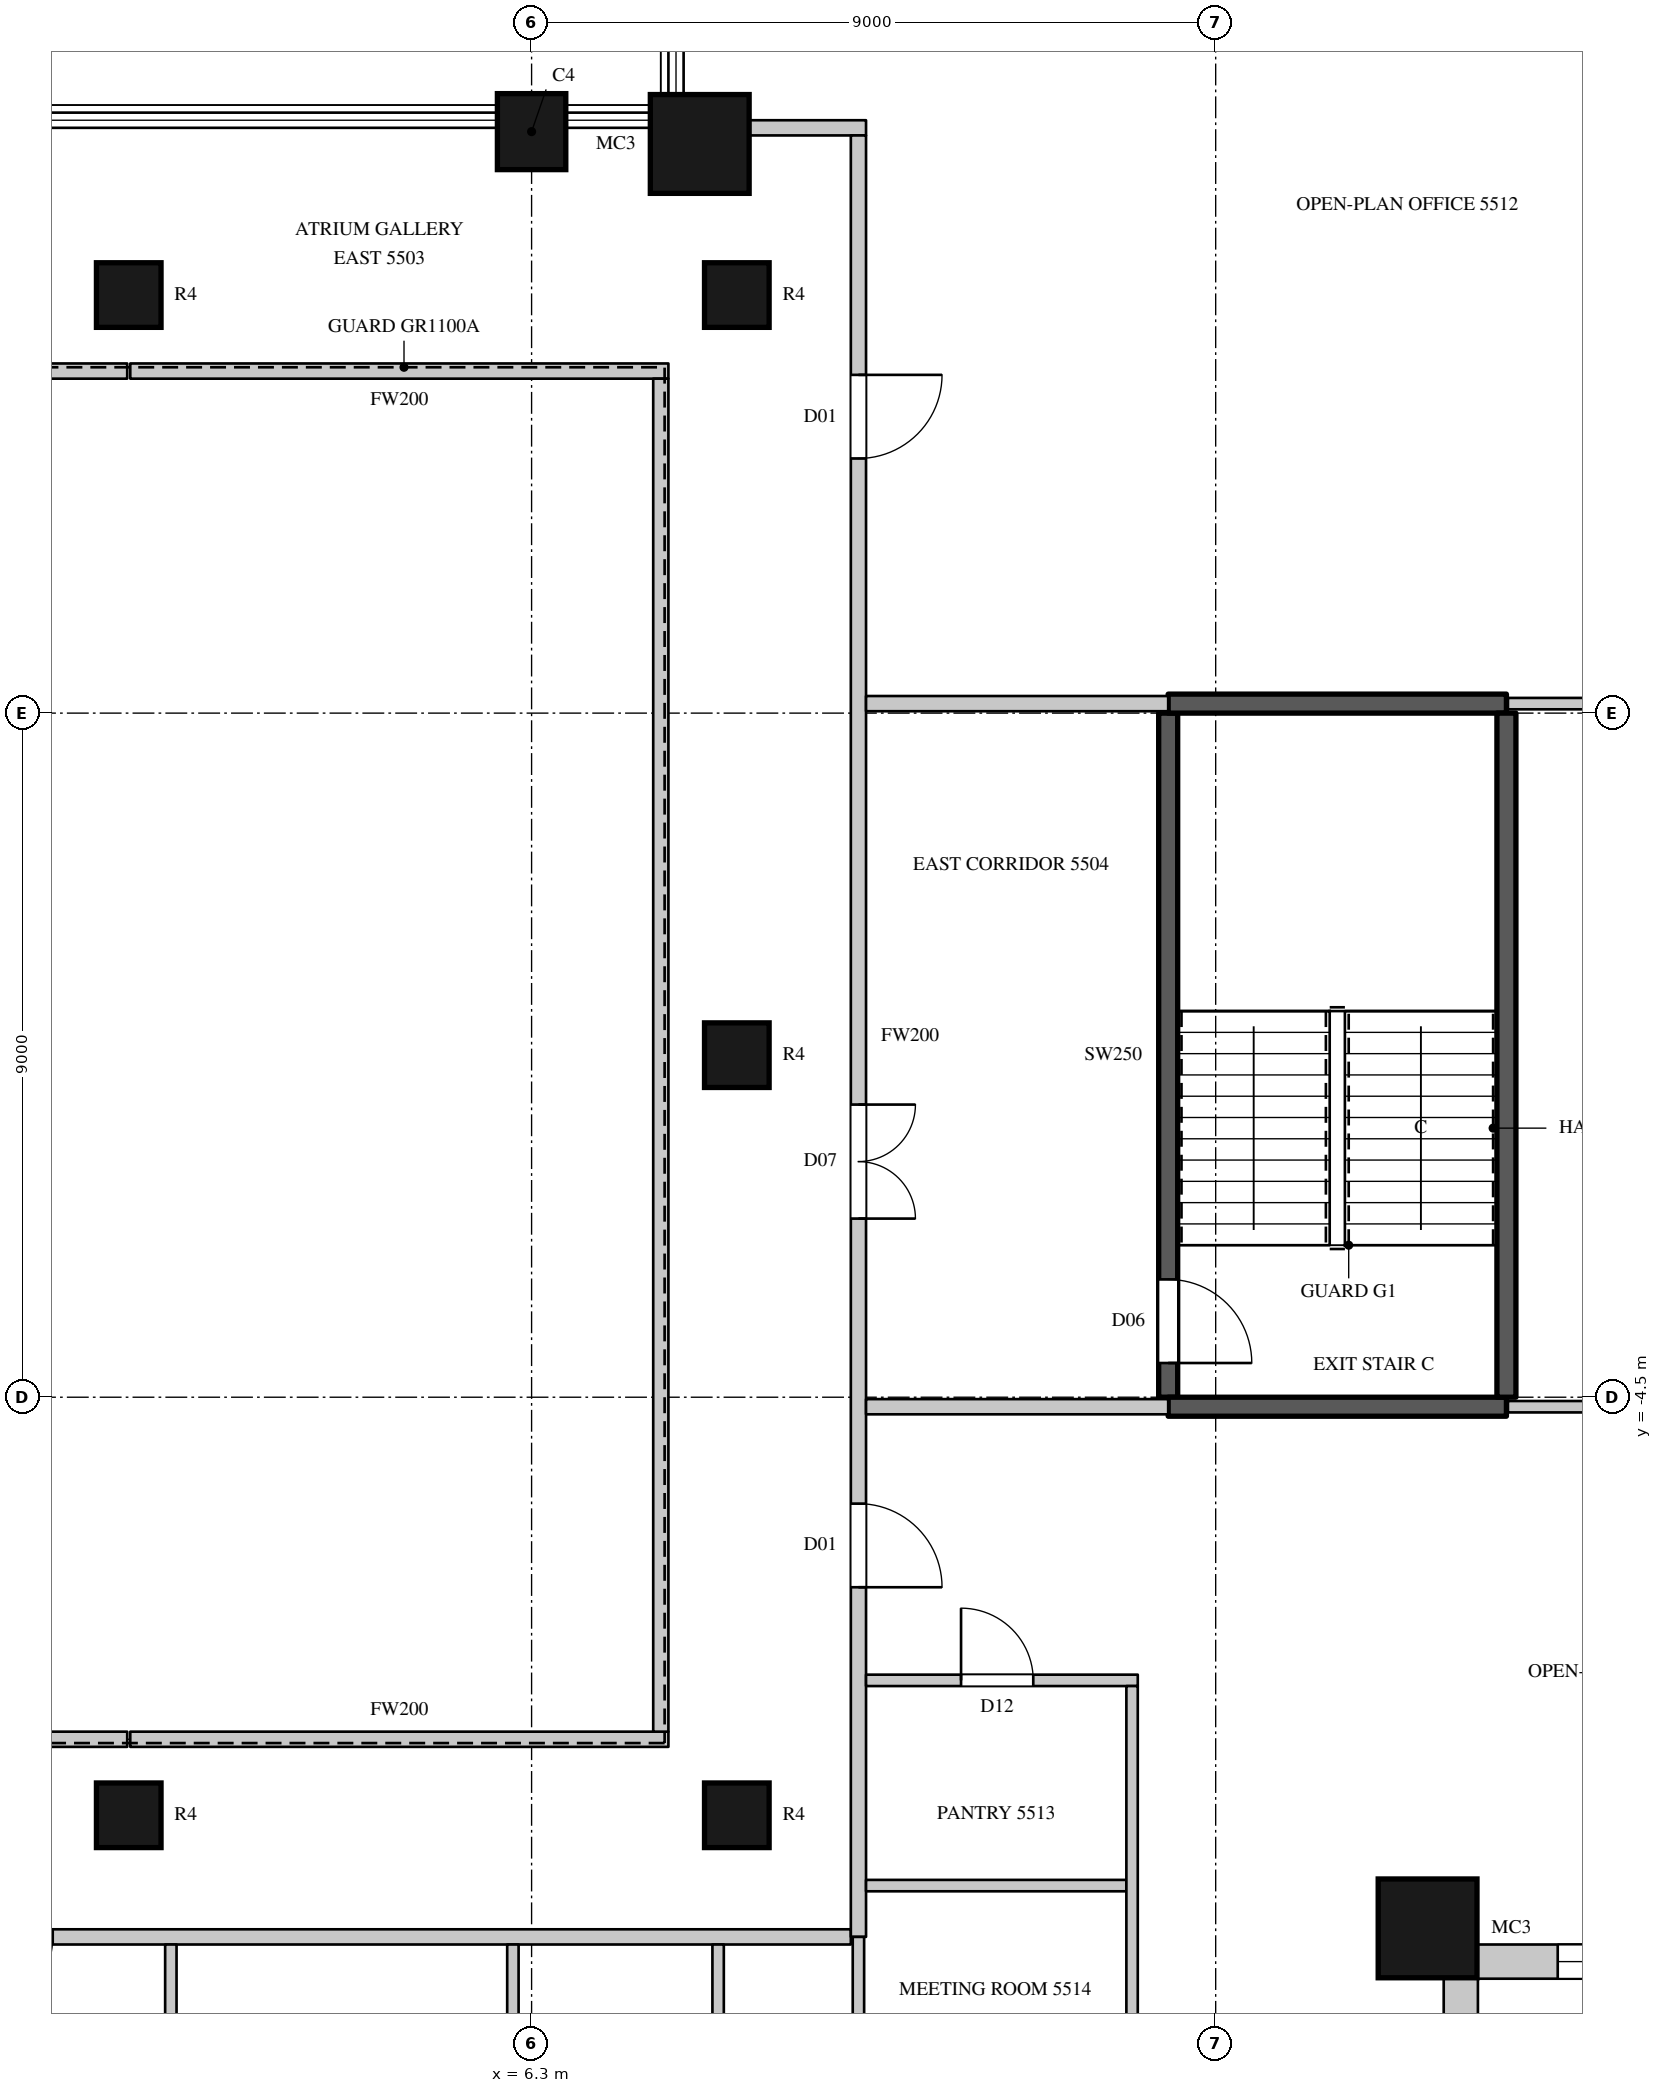
"""IFC4 building model, lengths in metres.
Left out: names, types, materials, properties, quantities, classifications, styles, units other than length and angle.
Written with IfcOpenShell. Run it as: python <this file> out.ifc"""

import sys

from ifc_helpers import new_model, si_unit, direction, frame, frame_2d, origin, origin_2d, place, context, subcontext, project, spatial, rectangle, circle, extrude, element, fill, save


model = new_model("IFC4")
c1 = context("Model", 3, precision=1e-05, world=origin(), true_north=direction((0.0, 1.0)))
c2 = subcontext(c1, "Body", "Model", "MODEL_VIEW")
j1 = project(units=[si_unit("LENGTHUNIT", "METRE"), si_unit("PLANEANGLEUNIT", "RADIAN")], contexts=[c1])
p1 = place(None, origin())
s1 = spatial("IfcSite", under=j1, at=p1, CompositionType="ELEMENT")
p2 = place(p1, origin())
s2 = spatial("IfcBuilding", under=s1, at=p2, CompositionType="ELEMENT")
p3 = place(p2, frame((0.0, 0.0, 247.5)))
s3 = spatial("IfcBuildingStorey", under=s2, at=p3, CompositionType="ELEMENT", Elevation=247.5)
p4 = place(p3, frame((8.512, 11.988, 0.0), z_axis=(0.0, 0.0, 1.0), x_axis=(1.0, 0.0, 0.0)))
e1 = element("IfcColumn", 1, at=p4, inside=s3, PredefinedType="COLUMN", context=c2, shape_type="SweptSolid", body=[
    extrude(circle(Radius=0.65, at=origin_2d()), origin(), (0.0, 0.0, 1.0), 4.1),
])
p5 = place(p3, frame((6.3, 12.15, 0.0), z_axis=(0.0, 0.0, 1.0), x_axis=(-1.0, 0.0, 0.0)))
e2 = element("IfcColumn", 2, at=p5, inside=s3, PredefinedType="COLUMN", context=c2, shape_type="SweptSolid", body=[
    extrude(rectangle(XDim=0.9, YDim=1.0, at=origin_2d()), origin(), (0.0, 0.0, 1.0), 4.1),
])
p6 = place(p3, frame((18.088, -11.488, 0.0), z_axis=(0.0, 0.0, 1.0), x_axis=(1.0, 0.0, 0.0)))
e3 = element("IfcColumn", 3, at=p6, inside=s3, PredefinedType="COLUMN", context=c2, shape_type="SweptSolid", body=[
    extrude(circle(Radius=0.65, at=origin_2d()), origin(), (0.0, 0.0, 1.0), 4.1),
])
for number, where, z_axis, x_axis in (
    (4, (1.0, -10.0, 0.0), (0.0, 0.0, 1.0), (1.0, 0.0, 0.0)),
    (5, (1.0, 10.0, 0.0), (0.0, 0.0, 1.0), (1.0, 0.0, 0.0)),
    (6, (9.0, -10.0, 0.0), (0.0, 0.0, 1.0), (1.0, 0.0, 0.0)),
    (7, (9.0, 0.0, 0.0), (0.0, 0.0, 1.0), (1.0, 0.0, 0.0)),
    (8, (9.0, 10.0, 0.0), (0.0, 0.0, 1.0), (1.0, 0.0, 0.0)),
):
    element("IfcColumn", number, at=place(p3, frame(where, z_axis=z_axis, x_axis=x_axis)), inside=s3, PredefinedType="COLUMN", context=c2, shape_type="SweptSolid", body=[
        extrude(circle(Radius=0.425, at=origin_2d()), origin(), (0.0, 0.0, 1.0), 4.1),
    ])
p7 = place(p3, frame((18.525, -16.304, 0.0), z_axis=(0.0, 0.0, 1.0), x_axis=(0.0, 1.0, 0.0)))
e9 = element("IfcWall", 9, at=p7, inside=s3, PredefinedType="SOLIDWALL", context=c2, shape_type="SweptSolid", body=[
    extrude(rectangle(XDim=4.202, YDim=0.45, at=frame_2d((2.101, 0.0))), origin(), (0.0, 0.0, 1.0), 3.8),
])
p8 = place(p7, frame((0.541, 0.0, 1.05)))
e10 = element("IfcOpeningElement", 10, at=p8, cuts=e9, PredefinedType="OPENING", context=c2, shape_type="SweptSolid", body=[
    extrude(rectangle(XDim=3.0, YDim=2.4, at=frame_2d((1.5, 1.2))), frame((0.0, 0.235, 0.0), z_axis=(0.0, -1.0, 0.0), x_axis=(1.0, 0.0, 0.0)), (0.0, 0.0, 1.0), 0.47),
])
p9 = place(p3, frame((18.701, -11.925, 0.0), z_axis=(0.0, 0.0, 1.0), x_axis=(1.0, 0.0, 0.0)))
e11 = element("IfcWall", 11, at=p9, inside=s3, PredefinedType="SOLIDWALL", context=c2, shape_type="SweptSolid", body=[
    extrude(rectangle(XDim=4.962, YDim=0.45, at=frame_2d((2.481, 0.0))), origin(), (0.0, 0.0, 1.0), 3.8),
])
p10 = place(p9, frame((1.098, 0.0, 1.05)))
e12 = element("IfcOpeningElement", 12, at=p10, cuts=e11, PredefinedType="OPENING", context=c2, shape_type="SweptSolid", body=[
    extrude(rectangle(XDim=3.0, YDim=2.4, at=frame_2d((1.5, 1.2))), frame((0.0, 0.235, 0.0), z_axis=(0.0, -1.0, 0.0), x_axis=(1.0, 0.0, 0.0)), (0.0, 0.0, 1.0), 0.47),
])
p11 = place(p3, frame((-10.9, -11.6, 0.0), z_axis=(0.0, 0.0, 1.0), x_axis=(1.0, 0.0, 0.0)))
e13 = element("IfcWall", 13, at=p11, inside=s3, PredefinedType="PARTITIONING", context=c2, shape_type="SweptSolid", body=[
    extrude(rectangle(XDim=21.4, YDim=0.2, at=frame_2d((10.7, 0.0))), origin(), (0.0, 0.0, 1.0), 3.8),
])
p12 = place(p11, frame((0.95, 0.0, 0.0)))
e14 = element("IfcOpeningElement", 14, at=p12, cuts=e13, PredefinedType="OPENING", context=c2, shape_type="SweptSolid", body=[
    extrude(rectangle(XDim=0.9, YDim=2.2, at=frame_2d((0.45, 1.1))), frame((0.0, 0.11, 0.0), z_axis=(0.0, -1.0, 0.0), x_axis=(1.0, 0.0, 0.0)), (0.0, 0.0, 1.0), 0.22),
])
p13 = place(p11, frame((4.2, 0.0, 0.0)))
e15 = element("IfcOpeningElement", 15, at=p13, cuts=e13, PredefinedType="OPENING", context=c2, shape_type="SweptSolid", body=[
    extrude(rectangle(XDim=0.9, YDim=2.2, at=frame_2d((0.45, 1.1))), frame((0.0, 0.11, 0.0), z_axis=(0.0, -1.0, 0.0), x_axis=(1.0, 0.0, 0.0)), (0.0, 0.0, 1.0), 0.22),
])
p14 = place(p11, frame((6.85, 0.0, 0.0)))
e16 = element("IfcOpeningElement", 16, at=p14, cuts=e13, PredefinedType="OPENING", context=c2, shape_type="SweptSolid", body=[
    extrude(rectangle(XDim=1.1, YDim=2.4, at=frame_2d((0.55, 1.2))), frame((0.0, 0.11, 0.0), z_axis=(0.0, -1.0, 0.0), x_axis=(1.0, 0.0, 0.0)), (0.0, 0.0, 1.0), 0.22),
])
p15 = place(p11, frame((9.8, 0.0, 0.0)))
e17 = element("IfcOpeningElement", 17, at=p15, cuts=e13, PredefinedType="OPENING", context=c2, shape_type="SweptSolid", body=[
    extrude(rectangle(XDim=1.1, YDim=2.4, at=frame_2d((0.55, 1.2))), frame((0.0, 0.11, 0.0), z_axis=(0.0, -1.0, 0.0), x_axis=(1.0, 0.0, 0.0)), (0.0, 0.0, 1.0), 0.22),
])
for number, where, z_axis, x_axis in (
    (18, (-6.1, -9.0, 0.0), (0.0, 0.0, 1.0), (1.0, 0.0, 0.0)),
    (19, (-6.1, 9.0, 0.0), (0.0, 0.0, 1.0), (1.0, 0.0, 0.0)),
    (20, (1.02, -9.0, 0.0), (0.0, 0.0, 1.0), (1.0, 0.0, 0.0)),
    (21, (1.02, 9.0, 0.0), (0.0, 0.0, 1.0), (1.0, 0.0, 0.0)),
):
    element("IfcWall", number, at=place(p3, frame(where, z_axis=z_axis, x_axis=x_axis)), inside=s3, PredefinedType="PARTITIONING", context=c2, shape_type="SweptSolid", body=[
        extrude(rectangle(XDim=7.08, YDim=0.2, at=frame_2d((3.54, 0.0))), origin(), (0.0, 0.0, 1.0), 3.8),
    ])
p16 = place(p3, frame((8.0, -8.9, 0.0), z_axis=(0.0, 0.0, 1.0), x_axis=(0.0, 1.0, 0.0)))
e22 = element("IfcWall", 22, at=p16, inside=s3, PredefinedType="PARTITIONING", context=c2, shape_type="SweptSolid", body=[
    extrude(rectangle(XDim=17.8, YDim=0.2, at=frame_2d((8.9, 0.0))), origin(), (0.0, 0.0, 1.0), 3.8),
])
p17 = place(p3, frame((9.144, 12.2, 0.0), z_axis=(0.0, 0.0, 1.0), x_axis=(1.0, 0.0, 0.0)))
e23 = element("IfcWall", 23, at=p17, inside=s3, PredefinedType="PARTITIONING", context=c2, shape_type="SweptSolid", body=[
    extrude(rectangle(XDim=1.556, YDim=0.2, at=frame_2d((0.778, 0.0))), origin(), (0.0, 0.0, 1.0), 3.8),
])
p18 = place(p3, frame((10.6, -11.6, 0.0), z_axis=(0.0, 0.0, 1.0), x_axis=(0.0, 1.0, 0.0)))
e24 = element("IfcWall", 24, at=p18, inside=s3, PredefinedType="PARTITIONING", context=c2, shape_type="SweptSolid", body=[
    extrude(rectangle(XDim=23.7, YDim=0.2, at=frame_2d((11.85, 0.0))), origin(), (0.0, 0.0, 1.0), 3.8),
])
p19 = place(p18, frame((9.45, 0.0, 0.0)))
e25 = element("IfcOpeningElement", 25, at=p19, cuts=e24, PredefinedType="OPENING", context=c2, shape_type="SweptSolid", body=[
    extrude(rectangle(XDim=1.5, YDim=2.4, at=frame_2d((0.75, 1.2))), frame((0.0, 0.11, 0.0), z_axis=(0.0, -1.0, 0.0), x_axis=(1.0, 0.0, 0.0)), (0.0, 0.0, 1.0), 0.22),
])
p20 = place(p18, frame((19.45, 0.0, 0.0)))
e26 = element("IfcOpeningElement", 26, at=p20, cuts=e24, PredefinedType="OPENING", context=c2, shape_type="SweptSolid", body=[
    extrude(rectangle(XDim=1.1, YDim=2.4, at=frame_2d((0.55, 1.2))), frame((0.0, 0.11, 0.0), z_axis=(0.0, -1.0, 0.0), x_axis=(1.0, 0.0, 0.0)), (0.0, 0.0, 1.0), 0.22),
])
p21 = place(p18, frame((4.6, 0.0, 0.0)))
e27 = element("IfcOpeningElement", 27, at=p21, cuts=e24, PredefinedType="OPENING", context=c2, shape_type="SweptSolid", body=[
    extrude(rectangle(XDim=1.1, YDim=2.4, at=frame_2d((0.55, 1.2))), frame((0.0, 0.11, 0.0), z_axis=(0.0, -1.0, 0.0), x_axis=(1.0, 0.0, 0.0)), (0.0, 0.0, 1.0), 0.22),
])
for number, where, z_axis, x_axis in (
    (28, (10.7, -4.625, 0.0), (0.0, 0.0, 1.0), (1.0, 0.0, 0.0)),
    (29, (10.7, 4.625, 0.0), (0.0, 0.0, 1.0), (1.0, 0.0, 0.0)),
):
    element("IfcWall", number, at=place(p3, frame(where, z_axis=z_axis, x_axis=x_axis)), inside=s3, PredefinedType="PARTITIONING", context=c2, shape_type="SweptSolid", body=[
        extrude(rectangle(XDim=3.975, YDim=0.2, at=frame_2d((1.988, 0.0))), origin(), (0.0, 0.0, 1.0), 3.8),
    ])
p22 = place(p3, frame((1.554, -15.425, 0.0), z_axis=(0.0, 0.0, 1.0), x_axis=(0.0, 1.0, 0.0)))
e30 = element("IfcWall", 30, at=p22, inside=s3, PredefinedType="PARTITIONING", context=c2, shape_type="SweptSolid", body=[
    extrude(rectangle(XDim=3.725, YDim=0.15, at=frame_2d((1.863, 0.0))), origin(), (0.0, 0.0, 1.0), 3.8),
])
p23 = place(p22, frame((0.15, 0.0, 0.0)))
e31 = element("IfcOpeningElement", 31, at=p23, cuts=e30, PredefinedType="OPENING", context=c2, shape_type="SweptSolid", body=[
    extrude(rectangle(XDim=0.95, YDim=2.2, at=frame_2d((0.475, 1.1))), frame((0.0, 0.085, 0.0), z_axis=(0.0, -1.0, 0.0), x_axis=(1.0, 0.0, 0.0)), (0.0, 0.0, 1.0), 0.17),
])
for number, where, z_axis, x_axis in (
    (32, (6.054, -15.425, 0.0), (0.0, 0.0, 1.0), (0.0, 1.0, 0.0)),
    (33, (8.754, -15.425, 0.0), (0.0, 0.0, 1.0), (0.0, 1.0, 0.0)),
):
    element("IfcWall", number, at=place(p3, frame(where, z_axis=z_axis, x_axis=x_axis)), inside=s3, PredefinedType="PARTITIONING", context=c2, shape_type="SweptSolid", body=[
        extrude(rectangle(XDim=3.725, YDim=0.15, at=frame_2d((1.863, 0.0))), origin(), (0.0, 0.0, 1.0), 3.8),
    ])
p24 = place(p3, frame((10.6, -20.864, 0.0), z_axis=(0.0, 0.0, 1.0), x_axis=(0.0, 1.0, 0.0)))
e34 = element("IfcWall", 34, at=p24, inside=s3, PredefinedType="PARTITIONING", context=c2, shape_type="SweptSolid", body=[
    extrude(rectangle(XDim=9.264, YDim=0.15, at=frame_2d((4.632, 0.0))), origin(), (0.0, 0.0, 1.0), 3.8),
])
p25 = place(p3, frame((10.7, -10.925, 0.0), z_axis=(0.0, 0.0, 1.0), x_axis=(1.0, 0.0, 0.0)))
e35 = element("IfcWall", 35, at=p25, inside=s3, PredefinedType="PARTITIONING", context=c2, shape_type="SweptSolid", body=[
    extrude(rectangle(XDim=3.425, YDim=0.15, at=frame_2d((1.712, 0.0))), origin(), (0.0, 0.0, 1.0), 3.8),
])
p26 = place(p3, frame((10.7, -8.225, 0.0), z_axis=(0.0, 0.0, 1.0), x_axis=(1.0, 0.0, 0.0)))
e36 = element("IfcWall", 36, at=p26, inside=s3, PredefinedType="PARTITIONING", context=c2, shape_type="SweptSolid", body=[
    extrude(rectangle(XDim=3.575, YDim=0.15, at=frame_2d((1.788, 0.0))), origin(), (0.0, 0.0, 1.0), 3.15),
])
p27 = place(p26, frame((1.25, 0.0, 0.0)))
e37 = element("IfcOpeningElement", 37, at=p27, cuts=e36, PredefinedType="OPENING", context=c2, shape_type="SweptSolid", body=[
    extrude(rectangle(XDim=0.95, YDim=2.2, at=frame_2d((0.475, 1.1))), frame((0.0, 0.085, 0.0), z_axis=(0.0, -1.0, 0.0), x_axis=(1.0, 0.0, 0.0)), (0.0, 0.0, 1.0), 0.17),
])
p28 = place(p3, frame((14.2, -14.45, 0.0), z_axis=(0.0, 0.0, 1.0), x_axis=(0.0, 1.0, 0.0)))
e38 = element("IfcWall", 38, at=p28, inside=s3, PredefinedType="PARTITIONING", context=c2, shape_type="SweptSolid", body=[
    extrude(rectangle(XDim=6.15, YDim=0.15, at=frame_2d((3.075, 0.0))), origin(), (0.0, 0.0, 1.0), 3.8),
])
for number, where, z_axis, x_axis in (
    (39, (19.145, -4.625, 0.0), (0.0, 0.0, 1.0), (1.0, 0.0, 0.0)),
    (40, (19.145, 4.625, 0.0), (0.0, 0.0, 1.0), (1.0, 0.0, 0.0)),
):
    element("IfcWall", number, at=place(p3, frame(where, z_axis=z_axis, x_axis=x_axis)), inside=s3, PredefinedType="PARTITIONING", context=c2, shape_type="SweptSolid", body=[
        extrude(rectangle(XDim=4.605, YDim=0.15, at=frame_2d((2.302, 0.0))), origin(), (0.0, 0.0, 1.0), 3.8),
    ])
p29 = place(p3, frame((14.675, -4.5, 0.0), z_axis=(0.0, 0.0, 1.0), x_axis=(0.0, 1.0, 0.0)))
e41 = element("IfcWall", 41, at=p29, inside=s3, PredefinedType="SHEAR", context=c2, shape_type="SweptSolid", body=[
    extrude(rectangle(XDim=9.0, YDim=0.25, at=frame_2d((4.5, 0.0))), origin(), (0.0, 0.0, 1.0), 3.8),
])
p30 = place(p29, frame((0.45, 0.0, 0.0)))
e42 = element("IfcOpeningElement", 42, at=p30, cuts=e41, PredefinedType="OPENING", context=c2, shape_type="SweptSolid", body=[
    extrude(rectangle(XDim=1.1, YDim=2.2, at=frame_2d((0.55, 1.1))), frame((0.0, 0.135, 0.0), z_axis=(0.0, -1.0, 0.0), x_axis=(1.0, 0.0, 0.0)), (0.0, 0.0, 1.0), 0.27),
])
for number, where, z_axis, x_axis in (
    (43, (14.675, -4.625, 0.0), (0.0, 0.0, 1.0), (1.0, 0.0, 0.0)),
    (44, (14.675, 4.625, 0.0), (0.0, 0.0, 1.0), (1.0, 0.0, 0.0)),
):
    element("IfcWall", number, at=place(p3, frame(where, z_axis=z_axis, x_axis=x_axis)), inside=s3, PredefinedType="SHEAR", context=c2, shape_type="SweptSolid", body=[
        extrude(rectangle(XDim=4.45, YDim=0.25, at=frame_2d((2.225, 0.0))), origin(), (0.0, 0.0, 1.0), 3.8),
    ])
p31 = place(p3, frame((19.125, -4.5, 0.0), z_axis=(0.0, 0.0, 1.0), x_axis=(0.0, 1.0, 0.0)))
e45 = element("IfcWall", 45, at=p31, inside=s3, PredefinedType="SHEAR", context=c2, shape_type="SweptSolid", body=[
    extrude(rectangle(XDim=9.0, YDim=0.25, at=frame_2d((4.5, 0.0))), origin(), (0.0, 0.0, 1.0), 3.8),
])
p32 = place(p10, origin())
e46 = element("IfcWindow", 46, at=p32, inside=s3, PartitioningType="SINGLE_PANEL", PredefinedType="WINDOW", context=c2, shape_type="SweptSolid", body=[
    extrude(rectangle(XDim=3.0, YDim=2.4, at=frame_2d((1.5, 1.2))), frame((0.0, 0.135, 0.0), z_axis=(0.0, -1.0, 0.0), x_axis=(1.0, 0.0, 0.0)), (0.0, 0.0, 1.0), 0.06),
])
fill(e12, e46)
p33 = place(p19, origin())
e47 = element("IfcDoor", 47, at=p33, inside=s3, OperationType="DOUBLE_DOOR_SINGLE_SWING", PredefinedType="DOOR", context=c2, shape_type="SweptSolid", body=[
    extrude(rectangle(XDim=1.5, YDim=2.4, at=frame_2d((0.75, 1.2))), frame((0.0, 0.025, 0.0), z_axis=(0.0, -1.0, 0.0), x_axis=(1.0, 0.0, 0.0)), (0.0, 0.0, 1.0), 0.05),
])
fill(e25, e47)
p34 = place(p15, origin())
e48 = element("IfcDoor", 48, at=p34, inside=s3, OperationType="SINGLE_SWING_RIGHT", PredefinedType="DOOR", context=c2, shape_type="SweptSolid", body=[
    extrude(rectangle(XDim=1.1, YDim=2.4, at=frame_2d((0.55, 1.2))), frame((0.0, 0.025, 0.0), z_axis=(0.0, -1.0, 0.0), x_axis=(1.0, 0.0, 0.0)), (0.0, 0.0, 1.0), 0.05),
])
fill(e17, e48)
p35 = place(p20, origin())
e49 = element("IfcDoor", 49, at=p35, inside=s3, OperationType="SINGLE_SWING_LEFT", PredefinedType="DOOR", context=c2, shape_type="SweptSolid", body=[
    extrude(rectangle(XDim=1.1, YDim=2.4, at=frame_2d((0.55, 1.2))), frame((0.0, 0.025, 0.0), z_axis=(0.0, -1.0, 0.0), x_axis=(1.0, 0.0, 0.0)), (0.0, 0.0, 1.0), 0.05),
])
fill(e26, e49)
p36 = place(p21, origin())
e50 = element("IfcDoor", 50, at=p36, inside=s3, OperationType="SINGLE_SWING_RIGHT", PredefinedType="DOOR", context=c2, shape_type="SweptSolid", body=[
    extrude(rectangle(XDim=1.1, YDim=2.4, at=frame_2d((0.55, 1.2))), frame((0.0, 0.025, 0.0), z_axis=(0.0, -1.0, 0.0), x_axis=(1.0, 0.0, 0.0)), (0.0, 0.0, 1.0), 0.05),
])
fill(e27, e50)
p37 = place(p27, origin())
e51 = element("IfcDoor", 51, at=p37, inside=s3, OperationType="SINGLE_SWING_LEFT", PredefinedType="DOOR", context=c2, shape_type="SweptSolid", body=[
    extrude(rectangle(XDim=0.95, YDim=2.2, at=frame_2d((0.475, 1.1))), frame((0.0, 0.025, 0.0), z_axis=(0.0, -1.0, 0.0), x_axis=(1.0, 0.0, 0.0)), (0.0, 0.0, 1.0), 0.05),
])
fill(e37, e51)
p38 = place(p30, origin())
e52 = element("IfcDoor", 52, at=p38, inside=s3, OperationType="SINGLE_SWING_RIGHT", PredefinedType="DOOR", context=c2, shape_type="SweptSolid", body=[
    extrude(rectangle(XDim=1.1, YDim=2.2, at=frame_2d((0.55, 1.1))), frame((0.0, 0.025, 0.0), z_axis=(0.0, -1.0, 0.0), x_axis=(1.0, 0.0, 0.0)), (0.0, 0.0, 1.0), 0.05),
])
fill(e42, e52)
save(model, sys.argv[1])
